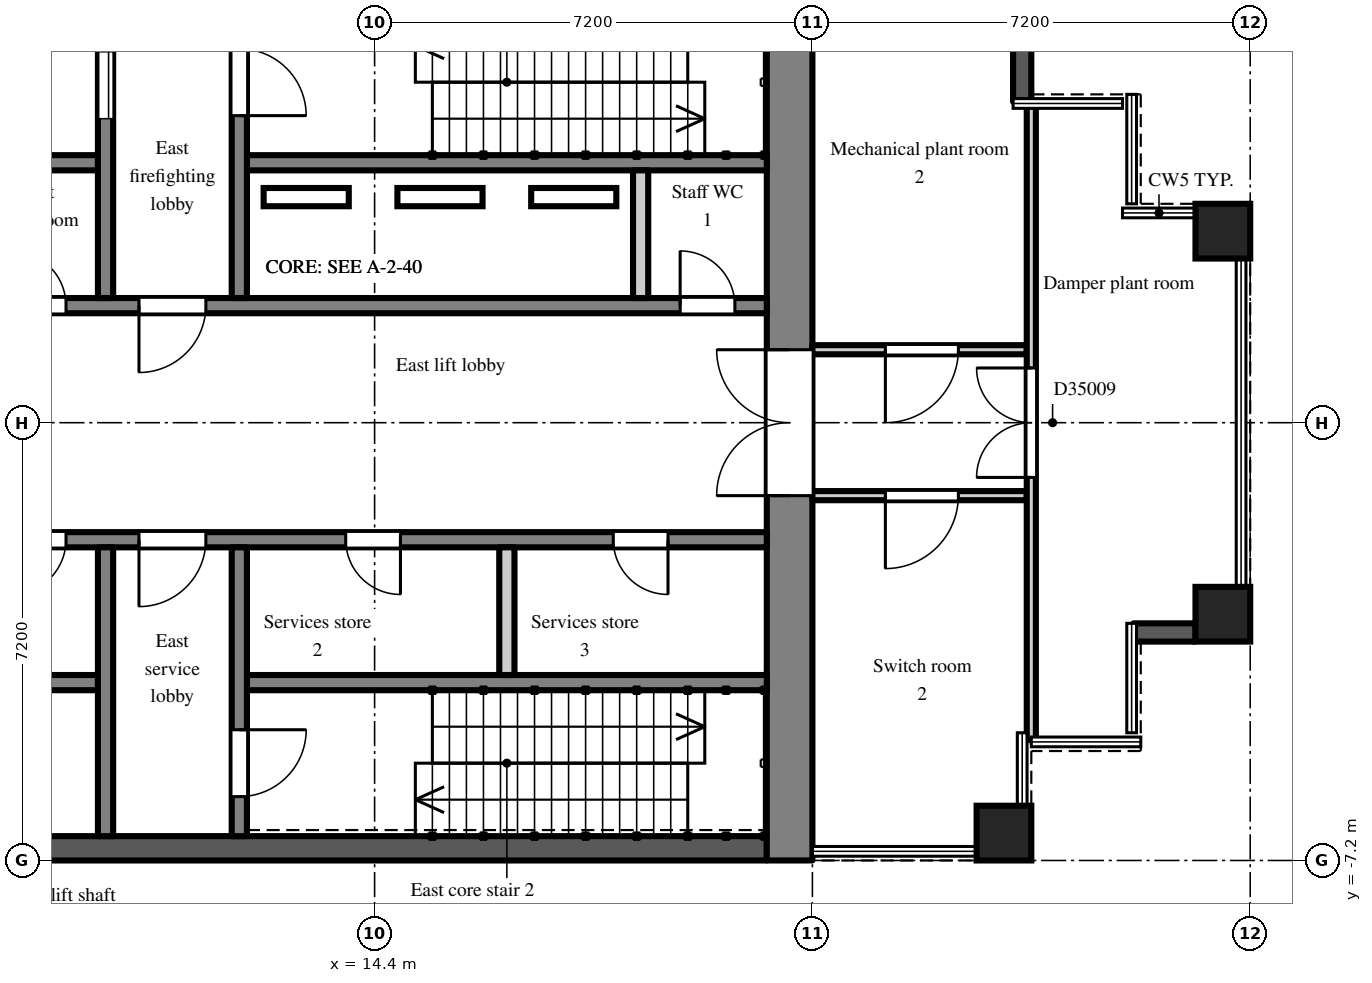
"""IFC4 building model, lengths in metres.
Left out: names, types, materials, properties, quantities, classifications, styles, units other than length and angle.
Written with IfcOpenShell. Run it as: python <this file> out.ifc"""

import sys

from ifc_helpers import new_model, si_unit, direction, frame, frame_2d, origin, origin_2d, place, context, subcontext, project, spatial, rectangle, extrude, element, fill, save


model = new_model("IFC4")
c1 = context("Model", 3, precision=1e-05, world=origin(), true_north=direction((0.0, 1.0)))
c2 = subcontext(c1, "Body", "Model", "MODEL_VIEW")
j1 = project(units=[si_unit("LENGTHUNIT", "METRE"), si_unit("PLANEANGLEUNIT", "RADIAN")], contexts=[c1])
p1 = place(None, origin())
s1 = spatial("IfcSite", under=j1, at=p1, CompositionType="ELEMENT")
p2 = place(p1, origin())
s2 = spatial("IfcBuilding", under=s1, at=p2, CompositionType="ELEMENT")
p3 = place(p2, frame((0.0, 0.0, 242.1)))
s3 = spatial("IfcBuildingStorey", under=s2, at=p3, CompositionType="ELEMENT", Elevation=242.1)
for number, where, z_axis, x_axis in (
    (1, (24.75, -6.75, 0.0), (0.0, 0.0, 1.0), (1.0, 0.0, 0.0)),
    (2, (28.35, -3.15, 0.0), (0.0, 0.0, 1.0), (1.0, 0.0, 0.0)),
    (3, (28.35, 3.15, 0.0), (0.0, 0.0, 1.0), (1.0, 0.0, 0.0)),
):
    element("IfcColumn", number, at=place(p3, frame(where, z_axis=z_axis, x_axis=x_axis)), inside=s3, PredefinedType="COLUMN", context=c2, shape_type="SweptSolid", body=[
        extrude(rectangle(XDim=0.9, YDim=0.9, at=origin_2d()), origin(), (0.0, 0.0, 1.0), 5.4),
    ])
for number, where, z_axis, x_axis in (
    (4, (26.88, -3.45, 0.0), (0.0, 0.0, 1.0), (1.0, 0.0, 0.0)),
    (5, (25.05, 5.28, 0.0), (0.0, 0.0, 1.0), (0.0, 1.0, 0.0)),
):
    element("IfcWall", number, at=place(p3, frame(where, z_axis=z_axis, x_axis=x_axis)), inside=s3, PredefinedType="SOLIDWALL", context=c2, shape_type="SweptSolid", body=[
        extrude(rectangle(XDim=1.02, YDim=0.3, at=frame_2d((0.51, 0.0))), origin(), (0.0, 0.0, 1.0), 4.95),
    ])
p4 = place(p3, frame((21.225, -7.2, 0.0), z_axis=(0.0, 0.0, 1.0), x_axis=(0.0, 1.0, 0.0)))
e6 = element("IfcWall", 6, at=p4, inside=s3, PredefinedType="SHEAR", context=c2, shape_type="SweptSolid", body=[
    extrude(rectangle(XDim=14.4, YDim=0.75, at=frame_2d((7.2, 0.0))), origin(), (0.0, 0.0, 1.0), 4.95),
])
p5 = place(p4, frame((6.0, 0.0, 0.0)))
e7 = element("IfcOpeningElement", 7, at=p5, cuts=e6, PredefinedType="OPENING", context=c2, shape_type="SweptSolid", body=[
    extrude(rectangle(XDim=2.4, YDim=2.2, at=frame_2d((1.2, 1.1))), frame((0.0, 0.385, 0.0), z_axis=(0.0, -1.0, 0.0), x_axis=(1.0, 0.0, 0.0)), (0.0, 0.0, 1.0), 0.77),
])
p6 = place(p3, frame((7.9, 1.925, 0.0), z_axis=(0.0, 0.0, 1.0), x_axis=(1.0, 0.0, 0.0)))
e8 = element("IfcWall", 8, at=p6, inside=s3, PredefinedType="SHEAR", context=c2, shape_type="SweptSolid", body=[
    extrude(rectangle(XDim=12.95, YDim=0.25, at=frame_2d((6.475, 0.0))), origin(), (0.0, 0.0, 1.0), 4.95),
])
p7 = place(p6, frame((0.525, 0.0, 0.0)))
e9 = element("IfcOpeningElement", 9, at=p7, cuts=e8, PredefinedType="OPENING", context=c2, shape_type="SweptSolid", body=[
    extrude(rectangle(XDim=0.9, YDim=2.1, at=frame_2d((0.45, 1.05))), frame((0.0, 0.135, 0.0), z_axis=(0.0, -1.0, 0.0), x_axis=(1.0, 0.0, 0.0)), (0.0, 0.0, 1.0), 0.27),
])
p8 = place(p6, frame((2.625, 0.0, 0.0)))
e10 = element("IfcOpeningElement", 10, at=p8, cuts=e8, PredefinedType="OPENING", context=c2, shape_type="SweptSolid", body=[
    extrude(rectangle(XDim=1.1, YDim=2.1, at=frame_2d((0.55, 1.05))), frame((0.0, 0.135, 0.0), z_axis=(0.0, -1.0, 0.0), x_axis=(1.0, 0.0, 0.0)), (0.0, 0.0, 1.0), 0.27),
])
p9 = place(p6, frame((11.525, 0.0, 0.0)))
e11 = element("IfcOpeningElement", 11, at=p9, cuts=e8, PredefinedType="OPENING", context=c2, shape_type="SweptSolid", body=[
    extrude(rectangle(XDim=0.9, YDim=2.1, at=frame_2d((0.45, 1.05))), frame((0.0, 0.135, 0.0), z_axis=(0.0, -1.0, 0.0), x_axis=(1.0, 0.0, 0.0)), (0.0, 0.0, 1.0), 0.27),
])
p10 = place(p3, frame((7.9, 4.275, 0.0), z_axis=(0.0, 0.0, 1.0), x_axis=(1.0, 0.0, 0.0)))
e12 = element("IfcWall", 12, at=p10, inside=s3, PredefinedType="SHEAR", context=c2, shape_type="SweptSolid", body=[
    extrude(rectangle(XDim=1.95, YDim=0.25, at=frame_2d((0.975, 0.0))), origin(), (0.0, 0.0, 1.0), 4.95),
])
p11 = place(p3, frame((12.3, 4.275, 0.0), z_axis=(0.0, 0.0, 1.0), x_axis=(1.0, 0.0, 0.0)))
e13 = element("IfcWall", 13, at=p11, inside=s3, PredefinedType="SHEAR", context=c2, shape_type="SweptSolid", body=[
    extrude(rectangle(XDim=8.55, YDim=0.25, at=frame_2d((4.275, 0.0))), origin(), (0.0, 0.0, 1.0), 4.95),
])
p12 = place(p3, frame((9.975, 2.05, 0.0), z_axis=(0.0, 0.0, 1.0), x_axis=(0.0, 1.0, 0.0)))
e14 = element("IfcWall", 14, at=p12, inside=s3, PredefinedType="SHEAR", context=c2, shape_type="SweptSolid", body=[
    extrude(rectangle(XDim=4.75, YDim=0.25, at=frame_2d((2.375, 0.0))), origin(), (0.0, 0.0, 1.0), 4.95),
])
p13 = place(p12, frame((2.95, 0.0, 0.0)))
e15 = element("IfcOpeningElement", 15, at=p13, cuts=e14, PredefinedType="OPENING", context=c2, shape_type="SweptSolid", body=[
    extrude(rectangle(XDim=1.1, YDim=2.1, at=frame_2d((0.55, 1.05))), frame((0.0, 0.135, 0.0), z_axis=(0.0, -1.0, 0.0), x_axis=(1.0, 0.0, 0.0)), (0.0, 0.0, 1.0), 0.27),
])
p14 = place(p3, frame((12.175, 2.05, 0.0), z_axis=(0.0, 0.0, 1.0), x_axis=(0.0, 1.0, 0.0)))
e16 = element("IfcWall", 16, at=p14, inside=s3, PredefinedType="SHEAR", context=c2, shape_type="SweptSolid", body=[
    extrude(rectangle(XDim=4.75, YDim=0.25, at=frame_2d((2.375, 0.0))), origin(), (0.0, 0.0, 1.0), 4.95),
])
p15 = place(p14, frame((3.0, 0.0, 0.0)))
e17 = element("IfcOpeningElement", 17, at=p15, cuts=e16, PredefinedType="OPENING", context=c2, shape_type="SweptSolid", body=[
    extrude(rectangle(XDim=1.1, YDim=2.1, at=frame_2d((0.55, 1.05))), frame((0.0, 0.135, 0.0), z_axis=(0.0, -1.0, 0.0), x_axis=(1.0, 0.0, 0.0)), (0.0, 0.0, 1.0), 0.27),
])
p16 = place(p3, frame((18.775, 2.05, 0.0), z_axis=(0.0, 0.0, 1.0), x_axis=(0.0, 1.0, 0.0)))
e18 = element("IfcWall", 18, at=p16, inside=s3, PredefinedType="PARTITIONING", context=c2, shape_type="SweptSolid", body=[
    extrude(rectangle(XDim=2.1, YDim=0.25, at=frame_2d((1.05, 0.0))), origin(), (0.0, 0.0, 1.0), 4.95),
])
p17 = place(p3, frame((7.9, -7.0, 0.0), z_axis=(0.0, 0.0, 1.0), x_axis=(1.0, 0.0, 0.0)))
e19 = element("IfcWall", 19, at=p17, inside=s3, PredefinedType="SHEAR", context=c2, shape_type="SweptSolid", body=[
    extrude(rectangle(XDim=12.95, YDim=0.4, at=frame_2d((6.475, 0.0))), origin(), (0.0, 0.0, 1.0), 4.95),
])
p18 = place(p3, frame((7.9, -1.925, 0.0), z_axis=(0.0, 0.0, 1.0), x_axis=(1.0, 0.0, 0.0)))
e20 = element("IfcWall", 20, at=p18, inside=s3, PredefinedType="SHEAR", context=c2, shape_type="SweptSolid", body=[
    extrude(rectangle(XDim=12.95, YDim=0.25, at=frame_2d((6.475, 0.0))), origin(), (0.0, 0.0, 1.0), 4.95),
])
p19 = place(p18, frame((0.525, 0.0, 0.0)))
e21 = element("IfcOpeningElement", 21, at=p19, cuts=e20, PredefinedType="OPENING", context=c2, shape_type="SweptSolid", body=[
    extrude(rectangle(XDim=0.9, YDim=2.1, at=frame_2d((0.45, 1.05))), frame((0.0, 0.135, 0.0), z_axis=(0.0, -1.0, 0.0), x_axis=(1.0, 0.0, 0.0)), (0.0, 0.0, 1.0), 0.27),
])
p20 = place(p18, frame((2.625, 0.0, 0.0)))
e22 = element("IfcOpeningElement", 22, at=p20, cuts=e20, PredefinedType="OPENING", context=c2, shape_type="SweptSolid", body=[
    extrude(rectangle(XDim=1.1, YDim=2.1, at=frame_2d((0.55, 1.05))), frame((0.0, 0.135, 0.0), z_axis=(0.0, -1.0, 0.0), x_axis=(1.0, 0.0, 0.0)), (0.0, 0.0, 1.0), 0.27),
])
p21 = place(p18, frame((6.025, 0.0, 0.0)))
e23 = element("IfcOpeningElement", 23, at=p21, cuts=e20, PredefinedType="OPENING", context=c2, shape_type="SweptSolid", body=[
    extrude(rectangle(XDim=0.9, YDim=2.1, at=frame_2d((0.45, 1.05))), frame((0.0, 0.135, 0.0), z_axis=(0.0, -1.0, 0.0), x_axis=(1.0, 0.0, 0.0)), (0.0, 0.0, 1.0), 0.27),
])
p22 = place(p18, frame((10.425, 0.0, 0.0)))
e24 = element("IfcOpeningElement", 24, at=p22, cuts=e20, PredefinedType="OPENING", context=c2, shape_type="SweptSolid", body=[
    extrude(rectangle(XDim=0.9, YDim=2.1, at=frame_2d((0.45, 1.05))), frame((0.0, 0.135, 0.0), z_axis=(0.0, -1.0, 0.0), x_axis=(1.0, 0.0, 0.0)), (0.0, 0.0, 1.0), 0.27),
])
p23 = place(p3, frame((7.9, -4.275, 0.0), z_axis=(0.0, 0.0, 1.0), x_axis=(1.0, 0.0, 0.0)))
e25 = element("IfcWall", 25, at=p23, inside=s3, PredefinedType="SHEAR", context=c2, shape_type="SweptSolid", body=[
    extrude(rectangle(XDim=1.95, YDim=0.25, at=frame_2d((0.975, 0.0))), origin(), (0.0, 0.0, 1.0), 4.95),
])
p24 = place(p3, frame((12.3, -4.275, 0.0), z_axis=(0.0, 0.0, 1.0), x_axis=(1.0, 0.0, 0.0)))
e26 = element("IfcWall", 26, at=p24, inside=s3, PredefinedType="SHEAR", context=c2, shape_type="SweptSolid", body=[
    extrude(rectangle(XDim=8.55, YDim=0.25, at=frame_2d((4.275, 0.0))), origin(), (0.0, 0.0, 1.0), 4.95),
])
p25 = place(p3, frame((9.975, -2.05, 0.0), z_axis=(0.0, 0.0, 1.0), x_axis=(0.0, -1.0, 0.0)))
e27 = element("IfcWall", 27, at=p25, inside=s3, PredefinedType="SHEAR", context=c2, shape_type="SweptSolid", body=[
    extrude(rectangle(XDim=4.75, YDim=0.25, at=frame_2d((2.375, 0.0))), origin(), (0.0, 0.0, 1.0), 4.95),
])
p26 = place(p3, frame((12.175, -2.05, 0.0), z_axis=(0.0, 0.0, 1.0), x_axis=(0.0, -1.0, 0.0)))
e28 = element("IfcWall", 28, at=p26, inside=s3, PredefinedType="SHEAR", context=c2, shape_type="SweptSolid", body=[
    extrude(rectangle(XDim=4.75, YDim=0.25, at=frame_2d((2.375, 0.0))), origin(), (0.0, 0.0, 1.0), 4.95),
])
p27 = place(p26, frame((3.0, 0.0, 0.0)))
e29 = element("IfcOpeningElement", 29, at=p27, cuts=e28, PredefinedType="OPENING", context=c2, shape_type="SweptSolid", body=[
    extrude(rectangle(XDim=1.1, YDim=2.1, at=frame_2d((0.55, 1.05))), frame((0.0, 0.135, 0.0), z_axis=(0.0, -1.0, 0.0), x_axis=(1.0, 0.0, 0.0)), (0.0, 0.0, 1.0), 0.27),
])
p28 = place(p3, frame((16.575, -2.05, 0.0), z_axis=(0.0, 0.0, 1.0), x_axis=(0.0, -1.0, 0.0)))
e30 = element("IfcWall", 30, at=p28, inside=s3, PredefinedType="PARTITIONING", context=c2, shape_type="SweptSolid", body=[
    extrude(rectangle(XDim=2.1, YDim=0.25, at=frame_2d((1.05, 0.0))), origin(), (0.0, 0.0, 1.0), 4.95),
])
p29 = place(p3, frame((21.6, -1.2, 0.0), z_axis=(0.0, 0.0, 1.0), x_axis=(1.0, 0.0, 0.0)))
e31 = element("IfcWall", 31, at=p29, inside=s3, PredefinedType="PARTITIONING", context=c2, shape_type="SweptSolid", body=[
    extrude(rectangle(XDim=3.525, YDim=0.15, at=frame_2d((1.762, 0.0))), origin(), (0.0, 0.0, 1.0), 4.95),
])
p30 = place(p29, frame((1.2, 0.0, 0.0)))
e32 = element("IfcOpeningElement", 32, at=p30, cuts=e31, PredefinedType="OPENING", context=c2, shape_type="SweptSolid", body=[
    extrude(rectangle(XDim=1.2, YDim=2.1, at=frame_2d((0.6, 1.05))), frame((0.0, 0.085, 0.0), z_axis=(0.0, -1.0, 0.0), x_axis=(1.0, 0.0, 0.0)), (0.0, 0.0, 1.0), 0.17),
])
p31 = place(p3, frame((21.6, 1.2, 0.0), z_axis=(0.0, 0.0, 1.0), x_axis=(1.0, 0.0, 0.0)))
e33 = element("IfcWall", 33, at=p31, inside=s3, PredefinedType="PARTITIONING", context=c2, shape_type="SweptSolid", body=[
    extrude(rectangle(XDim=3.525, YDim=0.15, at=frame_2d((1.762, 0.0))), origin(), (0.0, 0.0, 1.0), 4.95),
])
p32 = place(p31, frame((1.2, 0.0, 0.0)))
e34 = element("IfcOpeningElement", 34, at=p32, cuts=e33, PredefinedType="OPENING", context=c2, shape_type="SweptSolid", body=[
    extrude(rectangle(XDim=1.2, YDim=2.1, at=frame_2d((0.6, 1.05))), frame((0.0, 0.085, 0.0), z_axis=(0.0, -1.0, 0.0), x_axis=(1.0, 0.0, 0.0)), (0.0, 0.0, 1.0), 0.17),
])
p33 = place(p3, frame((25.2, -5.22, 0.0), z_axis=(0.0, 0.0, 1.0), x_axis=(0.0, 1.0, 0.0)))
e35 = element("IfcWall", 35, at=p33, inside=s3, PredefinedType="PARTITIONING", context=c2, shape_type="SweptSolid", body=[
    extrude(rectangle(XDim=10.44, YDim=0.15, at=frame_2d((5.22, 0.0))), origin(), (0.0, 0.0, 1.0), 4.95),
])
p34 = place(p33, frame((4.32, 0.0, 0.0)))
e36 = element("IfcOpeningElement", 36, at=p34, cuts=e35, PredefinedType="OPENING", context=c2, shape_type="SweptSolid", body=[
    extrude(rectangle(XDim=1.8, YDim=2.1, at=frame_2d((0.9, 1.05))), frame((0.0, 0.085, 0.0), z_axis=(0.0, -1.0, 0.0), x_axis=(1.0, 0.0, 0.0)), (0.0, 0.0, 1.0), 0.17),
])
p35 = place(p13, origin())
e37 = element("IfcDoor", 37, at=p35, inside=s3, OperationType="SLIDING_TO_LEFT", PredefinedType="DOOR", context=c2, shape_type="SweptSolid", body=[
    extrude(rectangle(XDim=1.1, YDim=2.1, at=frame_2d((0.55, 1.05))), frame((0.0, 0.025, 0.0), z_axis=(0.0, -1.0, 0.0), x_axis=(1.0, 0.0, 0.0)), (0.0, 0.0, 1.0), 0.05),
])
fill(e15, e37)
p36 = place(p15, frame((1.1, 0.0, 0.0), z_axis=(0.0, 0.0, 1.0), x_axis=(-1.0, 0.0, 0.0)))
e38 = element("IfcDoor", 38, at=p36, inside=s3, OperationType="SINGLE_SWING_RIGHT", PredefinedType="DOOR", context=c2, shape_type="SweptSolid", body=[
    extrude(rectangle(XDim=1.1, YDim=2.1, at=frame_2d((0.55, 1.05))), frame((0.0, 0.025, 0.0), z_axis=(0.0, -1.0, 0.0), x_axis=(1.0, 0.0, 0.0)), (0.0, 0.0, 1.0), 0.05),
])
fill(e17, e38)
p37 = place(p27, origin())
e39 = element("IfcDoor", 39, at=p37, inside=s3, OperationType="SINGLE_SWING_LEFT", PredefinedType="DOOR", context=c2, shape_type="SweptSolid", body=[
    extrude(rectangle(XDim=1.1, YDim=2.1, at=frame_2d((0.55, 1.05))), frame((0.0, 0.025, 0.0), z_axis=(0.0, -1.0, 0.0), x_axis=(1.0, 0.0, 0.0)), (0.0, 0.0, 1.0), 0.05),
])
fill(e29, e39)
p38 = place(p7, origin())
e40 = element("IfcDoor", 40, at=p38, inside=s3, OperationType="SINGLE_SWING_LEFT", PredefinedType="DOOR", context=c2, shape_type="SweptSolid", body=[
    extrude(rectangle(XDim=0.9, YDim=2.1, at=frame_2d((0.45, 1.05))), frame((0.0, 0.025, 0.0), z_axis=(0.0, -1.0, 0.0), x_axis=(1.0, 0.0, 0.0)), (0.0, 0.0, 1.0), 0.05),
])
fill(e9, e40)
p39 = place(p19, frame((0.9, 0.0, 0.0), z_axis=(0.0, 0.0, 1.0), x_axis=(-1.0, 0.0, 0.0)))
e41 = element("IfcDoor", 41, at=p39, inside=s3, OperationType="SINGLE_SWING_RIGHT", PredefinedType="DOOR", context=c2, shape_type="SweptSolid", body=[
    extrude(rectangle(XDim=0.9, YDim=2.1, at=frame_2d((0.45, 1.05))), frame((0.0, 0.025, 0.0), z_axis=(0.0, -1.0, 0.0), x_axis=(1.0, 0.0, 0.0)), (0.0, 0.0, 1.0), 0.05),
])
fill(e21, e41)
p40 = place(p8, frame((1.1, 0.0, 0.0), z_axis=(0.0, 0.0, 1.0), x_axis=(-1.0, 0.0, 0.0)))
e42 = element("IfcDoor", 42, at=p40, inside=s3, OperationType="SINGLE_SWING_RIGHT", PredefinedType="DOOR", context=c2, shape_type="SweptSolid", body=[
    extrude(rectangle(XDim=1.1, YDim=2.1, at=frame_2d((0.55, 1.05))), frame((0.0, 0.025, 0.0), z_axis=(0.0, -1.0, 0.0), x_axis=(1.0, 0.0, 0.0)), (0.0, 0.0, 1.0), 0.05),
])
fill(e10, e42)
p41 = place(p20, frame((1.1, 0.0, 0.0), z_axis=(0.0, 0.0, 1.0), x_axis=(-1.0, 0.0, 0.0)))
e43 = element("IfcDoor", 43, at=p41, inside=s3, OperationType="SINGLE_SWING_RIGHT", PredefinedType="DOOR", context=c2, shape_type="SweptSolid", body=[
    extrude(rectangle(XDim=1.1, YDim=2.1, at=frame_2d((0.55, 1.05))), frame((0.0, 0.025, 0.0), z_axis=(0.0, -1.0, 0.0), x_axis=(1.0, 0.0, 0.0)), (0.0, 0.0, 1.0), 0.05),
])
fill(e22, e43)
p42 = place(p5, origin())
e44 = element("IfcDoor", 44, at=p42, inside=s3, OperationType="DOUBLE_DOOR_DOUBLE_SWING", PredefinedType="DOOR", context=c2, shape_type="SweptSolid", body=[
    extrude(rectangle(XDim=2.4, YDim=2.2, at=frame_2d((1.2, 1.1))), frame((0.0, 0.025, 0.0), z_axis=(0.0, -1.0, 0.0), x_axis=(1.0, 0.0, 0.0)), (0.0, 0.0, 1.0), 0.05),
])
fill(e7, e44)
p43 = place(p9, origin())
e45 = element("IfcDoor", 45, at=p43, inside=s3, OperationType="SINGLE_SWING_LEFT", PredefinedType="DOOR", context=c2, shape_type="SweptSolid", body=[
    extrude(rectangle(XDim=0.9, YDim=2.1, at=frame_2d((0.45, 1.05))), frame((0.0, 0.025, 0.0), z_axis=(0.0, -1.0, 0.0), x_axis=(1.0, 0.0, 0.0)), (0.0, 0.0, 1.0), 0.05),
])
fill(e11, e45)
p44 = place(p21, frame((0.9, 0.0, 0.0), z_axis=(0.0, 0.0, 1.0), x_axis=(-1.0, 0.0, 0.0)))
e46 = element("IfcDoor", 46, at=p44, inside=s3, OperationType="SINGLE_SWING_LEFT", PredefinedType="DOOR", context=c2, shape_type="SweptSolid", body=[
    extrude(rectangle(XDim=0.9, YDim=2.1, at=frame_2d((0.45, 1.05))), frame((0.0, 0.025, 0.0), z_axis=(0.0, -1.0, 0.0), x_axis=(1.0, 0.0, 0.0)), (0.0, 0.0, 1.0), 0.05),
])
fill(e23, e46)
p45 = place(p22, frame((0.9, 0.0, 0.0), z_axis=(0.0, 0.0, 1.0), x_axis=(-1.0, 0.0, 0.0)))
e47 = element("IfcDoor", 47, at=p45, inside=s3, OperationType="SINGLE_SWING_LEFT", PredefinedType="DOOR", context=c2, shape_type="SweptSolid", body=[
    extrude(rectangle(XDim=0.9, YDim=2.1, at=frame_2d((0.45, 1.05))), frame((0.0, 0.025, 0.0), z_axis=(0.0, -1.0, 0.0), x_axis=(1.0, 0.0, 0.0)), (0.0, 0.0, 1.0), 0.05),
])
fill(e24, e47)
p46 = place(p34, origin())
e48 = element("IfcDoor", 48, at=p46, inside=s3, OperationType="DOUBLE_DOOR_DOUBLE_SWING", PredefinedType="DOOR", context=c2, shape_type="SweptSolid", body=[
    extrude(rectangle(XDim=1.8, YDim=2.1, at=frame_2d((0.9, 1.05))), frame((0.0, 0.025, 0.0), z_axis=(0.0, -1.0, 0.0), x_axis=(1.0, 0.0, 0.0)), (0.0, 0.0, 1.0), 0.05),
])
fill(e36, e48)
p47 = place(p32, frame((1.2, 0.0, 0.0), z_axis=(0.0, 0.0, 1.0), x_axis=(-1.0, 0.0, 0.0)))
e49 = element("IfcDoor", 49, at=p47, inside=s3, OperationType="SINGLE_SWING_RIGHT", PredefinedType="DOOR", context=c2, shape_type="SweptSolid", body=[
    extrude(rectangle(XDim=1.2, YDim=2.1, at=frame_2d((0.6, 1.05))), frame((0.0, 0.025, 0.0), z_axis=(0.0, -1.0, 0.0), x_axis=(1.0, 0.0, 0.0)), (0.0, 0.0, 1.0), 0.05),
])
fill(e34, e49)
p48 = place(p30, frame((1.2, 0.0, 0.0), z_axis=(0.0, 0.0, 1.0), x_axis=(-1.0, 0.0, 0.0)))
e50 = element("IfcDoor", 50, at=p48, inside=s3, OperationType="SINGLE_SWING_RIGHT", PredefinedType="DOOR", context=c2, shape_type="SweptSolid", body=[
    extrude(rectangle(XDim=1.2, YDim=2.1, at=frame_2d((0.6, 1.05))), frame((0.0, 0.025, 0.0), z_axis=(0.0, -1.0, 0.0), x_axis=(1.0, 0.0, 0.0)), (0.0, 0.0, 1.0), 0.05),
])
fill(e32, e50)
save(model, sys.argv[1])
